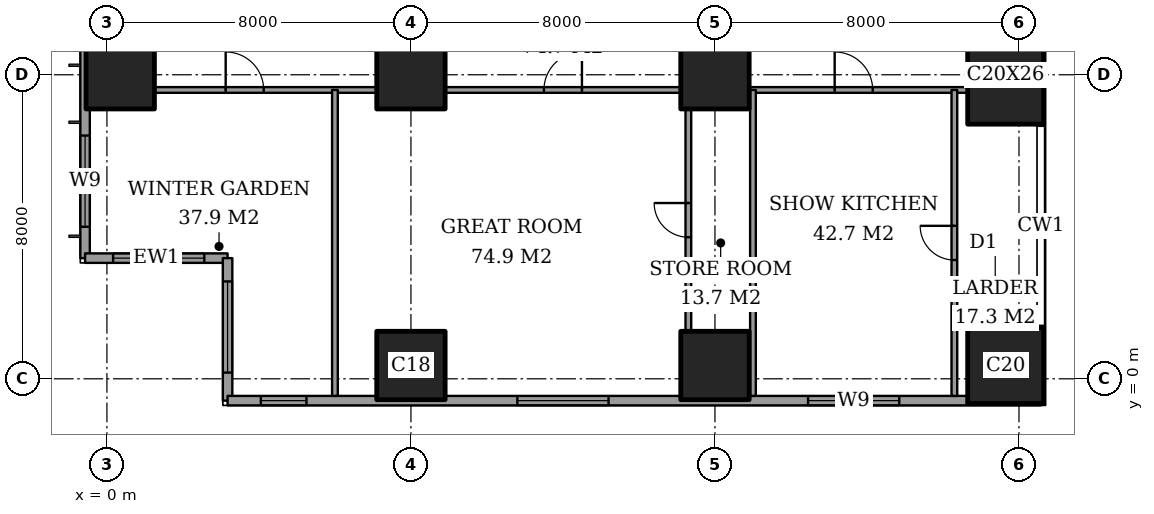
"""IFC4 building model, lengths in metres.
Left out: names, types, materials, properties, quantities, classifications, styles, units other than length and angle.
Written with IfcOpenShell. Run it as: python <this file> out.ifc"""

import sys

from ifc_helpers import new_model, si_unit, direction, frame, frame_2d, origin, origin_2d, place, context, subcontext, project, spatial, rectangle, extrude, element, fill, save


model = new_model("IFC4")
c1 = context("Model", 3, precision=1e-05, world=origin(), true_north=direction((0.0, 1.0)))
c2 = subcontext(c1, "Body", "Model", "MODEL_VIEW")
j1 = project(units=[si_unit("LENGTHUNIT", "METRE"), si_unit("PLANEANGLEUNIT", "RADIAN")], contexts=[c1])
p1 = place(None, origin())
s1 = spatial("IfcSite", under=j1, at=p1, CompositionType="ELEMENT")
p2 = place(p1, origin())
s2 = spatial("IfcBuilding", under=s1, at=p2, CompositionType="ELEMENT")
p3 = place(p2, frame((0.0, 0.0, 193.0)))
s3 = spatial("IfcBuildingStorey", under=s2, at=p3, CompositionType="ELEMENT", Elevation=193.0)
for number, where, z_axis, x_axis in (
    (1, (0.35, 8.0, 0.0), (0.0, 0.0, 1.0), (1.0, 0.0, 0.0)),
    (2, (8.0, 0.35, 0.0), (0.0, 0.0, 1.0), (1.0, 0.0, 0.0)),
    (3, (8.0, 8.0, 0.0), (0.0, 0.0, 1.0), (1.0, 0.0, 0.0)),
    (4, (16.0, 0.35, 0.0), (0.0, 0.0, 1.0), (1.0, 0.0, 0.0)),
    (5, (16.0, 8.0, 0.0), (0.0, 0.0, 1.0), (1.0, 0.0, 0.0)),
):
    element("IfcColumn", number, at=place(p3, frame(where, z_axis=z_axis, x_axis=x_axis)), inside=s3, PredefinedType="COLUMN", context=c2, shape_type="SweptSolid", body=[
        extrude(rectangle(XDim=1.8, YDim=1.8, at=origin_2d()), origin(), (0.0, 0.0, 1.0), 3.6),
    ])
p4 = place(p3, frame((23.65, 0.35, 0.0), z_axis=(0.0, 0.0, 1.0), x_axis=(1.0, 0.0, 0.0)))
e6 = element("IfcColumn", 6, at=p4, inside=s3, PredefinedType="COLUMN", context=c2, shape_type="SweptSolid", body=[
    extrude(rectangle(XDim=2.0, YDim=2.0, at=origin_2d()), origin(), (0.0, 0.0, 1.0), 3.6),
])
p5 = place(p3, frame((23.65, 8.0, 0.0), z_axis=(0.0, 0.0, 1.0), x_axis=(1.0, 0.0, 0.0)))
e7 = element("IfcColumn", 7, at=p5, inside=s3, PredefinedType="COLUMN", context=c2, shape_type="SweptSolid", body=[
    extrude(rectangle(XDim=2.0, YDim=2.6, at=origin_2d()), origin(), (0.0, 0.0, 1.0), 3.6),
])
p6 = place(p3, frame((-0.575, 44.825, 0.0), z_axis=(0.0, 0.0, 1.0), x_axis=(0.0, -1.0, 0.0)))
e8 = element("IfcWall", 8, at=p6, inside=s3, PredefinedType="SOLIDWALL", context=c2, shape_type="SweptSolid", body=[
    extrude(rectangle(XDim=41.65, YDim=0.25, at=frame_2d((20.825, 0.0))), origin(), (0.0, 0.0, 1.0), 3.6),
])
p7 = place(p6, frame((0.825, 0.0, 0.2)))
e9 = element("IfcOpeningElement", 9, at=p7, cuts=e8, PredefinedType="OPENING", context=c2, shape_type="SweptSolid", body=[
    extrude(rectangle(XDim=2.4, YDim=2.4, at=frame_2d((1.2, 1.2))), frame((0.0, 0.135, 0.0), z_axis=(0.0, -1.0, 0.0), x_axis=(1.0, 0.0, 0.0)), (0.0, 0.0, 1.0), 0.27),
])
p8 = place(p6, frame((6.05, 0.0, 0.2)))
e10 = element("IfcOpeningElement", 10, at=p8, cuts=e8, PredefinedType="OPENING", context=c2, shape_type="SweptSolid", body=[
    extrude(rectangle(XDim=1.2, YDim=2.4, at=frame_2d((0.6, 1.2))), frame((0.0, 0.135, 0.0), z_axis=(0.0, -1.0, 0.0), x_axis=(1.0, 0.0, 0.0)), (0.0, 0.0, 1.0), 0.27),
])
p9 = place(p6, frame((8.225, 0.0, 0.2)))
e11 = element("IfcOpeningElement", 11, at=p9, cuts=e8, PredefinedType="OPENING", context=c2, shape_type="SweptSolid", body=[
    extrude(rectangle(XDim=2.4, YDim=2.4, at=frame_2d((1.2, 1.2))), frame((0.0, 0.135, 0.0), z_axis=(0.0, -1.0, 0.0), x_axis=(1.0, 0.0, 0.0)), (0.0, 0.0, 1.0), 0.27),
])
p10 = place(p6, frame((15.625, 0.0, 0.2)))
e12 = element("IfcOpeningElement", 12, at=p10, cuts=e8, PredefinedType="OPENING", context=c2, shape_type="SweptSolid", body=[
    extrude(rectangle(XDim=2.4, YDim=2.4, at=frame_2d((1.2, 1.2))), frame((0.0, 0.135, 0.0), z_axis=(0.0, -1.0, 0.0), x_axis=(1.0, 0.0, 0.0)), (0.0, 0.0, 1.0), 0.27),
])
p11 = place(p6, frame((23.625, 0.0, 0.2)))
e13 = element("IfcOpeningElement", 13, at=p11, cuts=e8, PredefinedType="OPENING", context=c2, shape_type="SweptSolid", body=[
    extrude(rectangle(XDim=2.4, YDim=2.4, at=frame_2d((1.2, 1.2))), frame((0.0, 0.135, 0.0), z_axis=(0.0, -1.0, 0.0), x_axis=(1.0, 0.0, 0.0)), (0.0, 0.0, 1.0), 0.27),
])
p12 = place(p6, frame((30.775, 0.0, 0.2)))
e14 = element("IfcOpeningElement", 14, at=p12, cuts=e8, PredefinedType="OPENING", context=c2, shape_type="SweptSolid", body=[
    extrude(rectangle(XDim=2.4, YDim=2.4, at=frame_2d((1.2, 1.2))), frame((0.0, 0.135, 0.0), z_axis=(0.0, -1.0, 0.0), x_axis=(1.0, 0.0, 0.0)), (0.0, 0.0, 1.0), 0.27),
])
p13 = place(p6, frame((34.55, 0.0, 0.2)))
e15 = element("IfcOpeningElement", 15, at=p13, cuts=e8, PredefinedType="OPENING", context=c2, shape_type="SweptSolid", body=[
    extrude(rectangle(XDim=1.2, YDim=2.4, at=frame_2d((0.6, 1.2))), frame((0.0, 0.135, 0.0), z_axis=(0.0, -1.0, 0.0), x_axis=(1.0, 0.0, 0.0)), (0.0, 0.0, 1.0), 0.27),
])
p14 = place(p6, frame((38.425, 0.0, 0.2)))
e16 = element("IfcOpeningElement", 16, at=p14, cuts=e8, PredefinedType="OPENING", context=c2, shape_type="SweptSolid", body=[
    extrude(rectangle(XDim=2.4, YDim=2.4, at=frame_2d((1.2, 1.2))), frame((0.0, 0.135, 0.0), z_axis=(0.0, -1.0, 0.0), x_axis=(1.0, 0.0, 0.0)), (0.0, 0.0, 1.0), 0.27),
])
p15 = place(p3, frame((-0.575, 3.175, 0.0), z_axis=(0.0, 0.0, 1.0), x_axis=(1.0, 0.0, 0.0)))
e17 = element("IfcWall", 17, at=p15, inside=s3, PredefinedType="SOLIDWALL", context=c2, shape_type="SweptSolid", body=[
    extrude(rectangle(XDim=3.75, YDim=0.25, at=frame_2d((1.875, 0.0))), origin(), (0.0, 0.0, 1.0), 3.6),
])
p16 = place(p15, frame((0.738, 0.0, 0.2)))
e18 = element("IfcOpeningElement", 18, at=p16, cuts=e17, PredefinedType="OPENING", context=c2, shape_type="SweptSolid", body=[
    extrude(rectangle(XDim=2.4, YDim=2.4, at=frame_2d((1.2, 1.2))), frame((0.0, 0.135, 0.0), z_axis=(0.0, -1.0, 0.0), x_axis=(1.0, 0.0, 0.0)), (0.0, 0.0, 1.0), 0.27),
])
p17 = place(p3, frame((3.175, 3.175, 0.0), z_axis=(0.0, 0.0, 1.0), x_axis=(0.0, -1.0, 0.0)))
e19 = element("IfcWall", 19, at=p17, inside=s3, PredefinedType="SOLIDWALL", context=c2, shape_type="SweptSolid", body=[
    extrude(rectangle(XDim=3.75, YDim=0.25, at=frame_2d((1.875, 0.0))), origin(), (0.0, 0.0, 1.0), 3.6),
])
p18 = place(p17, frame((0.613, 0.0, 0.2)))
e20 = element("IfcOpeningElement", 20, at=p18, cuts=e19, PredefinedType="OPENING", context=c2, shape_type="SweptSolid", body=[
    extrude(rectangle(XDim=2.4, YDim=2.4, at=frame_2d((1.2, 1.2))), frame((0.0, 0.135, 0.0), z_axis=(0.0, -1.0, 0.0), x_axis=(1.0, 0.0, 0.0)), (0.0, 0.0, 1.0), 0.27),
])
p19 = place(p3, frame((3.175, -0.575, 0.0), z_axis=(0.0, 0.0, 1.0), x_axis=(1.0, 0.0, 0.0)))
e21 = element("IfcWall", 21, at=p19, inside=s3, PredefinedType="SOLIDWALL", context=c2, shape_type="SweptSolid", body=[
    extrude(rectangle(XDim=21.4, YDim=0.25, at=frame_2d((10.7, 0.0))), origin(), (0.0, 0.0, 1.0), 3.6),
])
p20 = place(p19, frame((0.875, 0.0, 0.2)))
e22 = element("IfcOpeningElement", 22, at=p20, cuts=e21, PredefinedType="OPENING", context=c2, shape_type="SweptSolid", body=[
    extrude(rectangle(XDim=1.2, YDim=2.4, at=frame_2d((0.6, 1.2))), frame((0.0, 0.135, 0.0), z_axis=(0.0, -1.0, 0.0), x_axis=(1.0, 0.0, 0.0)), (0.0, 0.0, 1.0), 0.27),
])
p21 = place(p19, frame((7.625, 0.0, 0.2)))
e23 = element("IfcOpeningElement", 23, at=p21, cuts=e21, PredefinedType="OPENING", context=c2, shape_type="SweptSolid", body=[
    extrude(rectangle(XDim=2.4, YDim=2.4, at=frame_2d((1.2, 1.2))), frame((0.0, 0.135, 0.0), z_axis=(0.0, -1.0, 0.0), x_axis=(1.0, 0.0, 0.0)), (0.0, 0.0, 1.0), 0.27),
])
p22 = place(p19, frame((15.275, 0.0, 0.2)))
e24 = element("IfcOpeningElement", 24, at=p22, cuts=e21, PredefinedType="OPENING", context=c2, shape_type="SweptSolid", body=[
    extrude(rectangle(XDim=2.4, YDim=2.4, at=frame_2d((1.2, 1.2))), frame((0.0, 0.135, 0.0), z_axis=(0.0, -1.0, 0.0), x_axis=(1.0, 0.0, 0.0)), (0.0, 0.0, 1.0), 0.27),
])
p23 = place(p3, frame((1.25, 7.6, 0.0), z_axis=(0.0, 0.0, 1.0), x_axis=(1.0, 0.0, 0.0)))
e25 = element("IfcWall", 25, at=p23, inside=s3, PredefinedType="PARTITIONING", context=c2, shape_type="SweptSolid", body=[
    extrude(rectangle(XDim=5.85, YDim=0.15, at=frame_2d((2.925, 0.0))), origin(), (0.0, 0.0, 1.0), 3.35),
])
p24 = place(p23, frame((1.875, 0.0, 0.0)))
e26 = element("IfcOpeningElement", 26, at=p24, cuts=e25, PredefinedType="OPENING", context=c2, shape_type="SweptSolid", body=[
    extrude(rectangle(XDim=1.0, YDim=2.1, at=frame_2d((0.5, 1.05))), frame((0.0, 0.085, 0.0), z_axis=(0.0, -1.0, 0.0), x_axis=(1.0, 0.0, 0.0)), (0.0, 0.0, 1.0), 0.17),
])
p25 = place(p3, frame((8.9, 7.6, 0.0), z_axis=(0.0, 0.0, 1.0), x_axis=(1.0, 0.0, 0.0)))
e27 = element("IfcWall", 27, at=p25, inside=s3, PredefinedType="PARTITIONING", context=c2, shape_type="SweptSolid", body=[
    extrude(rectangle(XDim=6.2, YDim=0.15, at=frame_2d((3.1, 0.0))), origin(), (0.0, 0.0, 1.0), 3.35),
])
p26 = place(p25, frame((2.6, 0.0, 0.0)))
e28 = element("IfcOpeningElement", 28, at=p26, cuts=e27, PredefinedType="OPENING", context=c2, shape_type="SweptSolid", body=[
    extrude(rectangle(XDim=1.0, YDim=2.1, at=frame_2d((0.5, 1.05))), frame((0.0, 0.085, 0.0), z_axis=(0.0, -1.0, 0.0), x_axis=(1.0, 0.0, 0.0)), (0.0, 0.0, 1.0), 0.17),
])
p27 = place(p3, frame((16.9, 7.6, 0.0), z_axis=(0.0, 0.0, 1.0), x_axis=(1.0, 0.0, 0.0)))
e29 = element("IfcWall", 29, at=p27, inside=s3, PredefinedType="PARTITIONING", context=c2, shape_type="SweptSolid", body=[
    extrude(rectangle(XDim=5.75, YDim=0.15, at=frame_2d((2.875, 0.0))), origin(), (0.0, 0.0, 1.0), 3.35),
])
p28 = place(p27, frame((2.25, 0.0, 0.0)))
e30 = element("IfcOpeningElement", 30, at=p28, cuts=e29, PredefinedType="OPENING", context=c2, shape_type="SweptSolid", body=[
    extrude(rectangle(XDim=1.0, YDim=2.1, at=frame_2d((0.5, 1.05))), frame((0.0, 0.085, 0.0), z_axis=(0.0, -1.0, 0.0), x_axis=(1.0, 0.0, 0.0)), (0.0, 0.0, 1.0), 0.17),
])
p29 = place(p3, frame((6.0, -0.45, 0.0), z_axis=(0.0, 0.0, 1.0), x_axis=(0.0, 1.0, 0.0)))
e31 = element("IfcWall", 31, at=p29, inside=s3, PredefinedType="PARTITIONING", context=c2, shape_type="SweptSolid", body=[
    extrude(rectangle(XDim=8.05, YDim=0.15, at=frame_2d((4.025, 0.0))), origin(), (0.0, 0.0, 1.0), 3.35),
])
p30 = place(p3, frame((15.3, 1.25, 0.0), z_axis=(0.0, 0.0, 1.0), x_axis=(0.0, 1.0, 0.0)))
e32 = element("IfcWall", 32, at=p30, inside=s3, PredefinedType="PARTITIONING", context=c2, shape_type="SweptSolid", body=[
    extrude(rectangle(XDim=5.85, YDim=0.15, at=frame_2d((2.925, 0.0))), origin(), (0.0, 0.0, 1.0), 3.35),
])
p31 = place(p30, frame((2.475, 0.0, 0.0)))
e33 = element("IfcOpeningElement", 33, at=p31, cuts=e32, PredefinedType="OPENING", context=c2, shape_type="SweptSolid", body=[
    extrude(rectangle(XDim=0.9, YDim=2.1, at=frame_2d((0.45, 1.05))), frame((0.0, 0.085, 0.0), z_axis=(0.0, -1.0, 0.0), x_axis=(1.0, 0.0, 0.0)), (0.0, 0.0, 1.0), 0.17),
])
p32 = place(p3, frame((17.0, -0.45, 0.0), z_axis=(0.0, 0.0, 1.0), x_axis=(0.0, 1.0, 0.0)))
e34 = element("IfcWall", 34, at=p32, inside=s3, PredefinedType="PARTITIONING", context=c2, shape_type="SweptSolid", body=[
    extrude(rectangle(XDim=8.05, YDim=0.15, at=frame_2d((4.025, 0.0))), origin(), (0.0, 0.0, 1.0), 3.35),
])
p33 = place(p3, frame((22.3, -0.45, 0.0), z_axis=(0.0, 0.0, 1.0), x_axis=(0.0, 1.0, 0.0)))
e35 = element("IfcWall", 35, at=p33, inside=s3, PredefinedType="PARTITIONING", context=c2, shape_type="SweptSolid", body=[
    extrude(rectangle(XDim=8.05, YDim=0.15, at=frame_2d((4.025, 0.0))), origin(), (0.0, 0.0, 1.0), 3.35),
])
p34 = place(p33, frame((3.575, 0.0, 0.0)))
e36 = element("IfcOpeningElement", 36, at=p34, cuts=e35, PredefinedType="OPENING", context=c2, shape_type="SweptSolid", body=[
    extrude(rectangle(XDim=0.9, YDim=2.1, at=frame_2d((0.45, 1.05))), frame((0.0, 0.085, 0.0), z_axis=(0.0, -1.0, 0.0), x_axis=(1.0, 0.0, 0.0)), (0.0, 0.0, 1.0), 0.17),
])
p35 = place(p14, origin())
e37 = element("IfcWindow", 37, at=p35, inside=s3, PartitioningType="SINGLE_PANEL", PredefinedType="WINDOW", context=c2, shape_type="SweptSolid", body=[
    extrude(rectangle(XDim=2.4, YDim=2.4, at=frame_2d((1.2, 1.2))), frame((0.0, 0.03, 0.0), z_axis=(0.0, -1.0, 0.0), x_axis=(1.0, 0.0, 0.0)), (0.0, 0.0, 1.0), 0.06),
])
fill(e16, e37)
p36 = place(p16, origin())
e38 = element("IfcWindow", 38, at=p36, inside=s3, PartitioningType="SINGLE_PANEL", PredefinedType="WINDOW", context=c2, shape_type="SweptSolid", body=[
    extrude(rectangle(XDim=2.4, YDim=2.4, at=frame_2d((1.2, 1.2))), frame((0.0, 0.03, 0.0), z_axis=(0.0, -1.0, 0.0), x_axis=(1.0, 0.0, 0.0)), (0.0, 0.0, 1.0), 0.06),
])
fill(e18, e38)
p37 = place(p18, origin())
e39 = element("IfcWindow", 39, at=p37, inside=s3, PartitioningType="SINGLE_PANEL", PredefinedType="WINDOW", context=c2, shape_type="SweptSolid", body=[
    extrude(rectangle(XDim=2.4, YDim=2.4, at=frame_2d((1.2, 1.2))), frame((0.0, 0.03, 0.0), z_axis=(0.0, -1.0, 0.0), x_axis=(1.0, 0.0, 0.0)), (0.0, 0.0, 1.0), 0.06),
])
fill(e20, e39)
p38 = place(p20, origin())
e40 = element("IfcWindow", 40, at=p38, inside=s3, PartitioningType="SINGLE_PANEL", PredefinedType="WINDOW", context=c2, shape_type="SweptSolid", body=[
    extrude(rectangle(XDim=1.2, YDim=2.4, at=frame_2d((0.6, 1.2))), frame((0.0, 0.03, 0.0), z_axis=(0.0, -1.0, 0.0), x_axis=(1.0, 0.0, 0.0)), (0.0, 0.0, 1.0), 0.06),
])
fill(e22, e40)
p39 = place(p21, origin())
e41 = element("IfcWindow", 41, at=p39, inside=s3, PartitioningType="SINGLE_PANEL", PredefinedType="WINDOW", context=c2, shape_type="SweptSolid", body=[
    extrude(rectangle(XDim=2.4, YDim=2.4, at=frame_2d((1.2, 1.2))), frame((0.0, 0.03, 0.0), z_axis=(0.0, -1.0, 0.0), x_axis=(1.0, 0.0, 0.0)), (0.0, 0.0, 1.0), 0.06),
])
fill(e23, e41)
p40 = place(p22, origin())
e42 = element("IfcWindow", 42, at=p40, inside=s3, PartitioningType="SINGLE_PANEL", PredefinedType="WINDOW", context=c2, shape_type="SweptSolid", body=[
    extrude(rectangle(XDim=2.4, YDim=2.4, at=frame_2d((1.2, 1.2))), frame((0.0, 0.03, 0.0), z_axis=(0.0, -1.0, 0.0), x_axis=(1.0, 0.0, 0.0)), (0.0, 0.0, 1.0), 0.06),
])
fill(e24, e42)
p41 = place(p24, origin())
e43 = element("IfcDoor", 43, at=p41, inside=s3, OperationType="SINGLE_SWING_RIGHT", PredefinedType="DOOR", context=c2, shape_type="SweptSolid", body=[
    extrude(rectangle(XDim=1.0, YDim=2.1, at=frame_2d((0.5, 1.05))), frame((0.0, 0.025, 0.0), z_axis=(0.0, -1.0, 0.0), x_axis=(1.0, 0.0, 0.0)), (0.0, 0.0, 1.0), 0.05),
])
fill(e26, e43)
p42 = place(p26, origin())
e44 = element("IfcDoor", 44, at=p42, inside=s3, OperationType="SINGLE_SWING_LEFT", PredefinedType="DOOR", context=c2, shape_type="SweptSolid", body=[
    extrude(rectangle(XDim=1.0, YDim=2.1, at=frame_2d((0.5, 1.05))), frame((0.0, 0.025, 0.0), z_axis=(0.0, -1.0, 0.0), x_axis=(1.0, 0.0, 0.0)), (0.0, 0.0, 1.0), 0.05),
])
fill(e28, e44)
p43 = place(p31, origin())
e45 = element("IfcDoor", 45, at=p43, inside=s3, OperationType="SINGLE_SWING_LEFT", PredefinedType="DOOR", context=c2, shape_type="SweptSolid", body=[
    extrude(rectangle(XDim=0.9, YDim=2.1, at=frame_2d((0.45, 1.05))), frame((0.0, 0.025, 0.0), z_axis=(0.0, -1.0, 0.0), x_axis=(1.0, 0.0, 0.0)), (0.0, 0.0, 1.0), 0.05),
])
fill(e33, e45)
p44 = place(p28, origin())
e46 = element("IfcDoor", 46, at=p44, inside=s3, OperationType="SINGLE_SWING_RIGHT", PredefinedType="DOOR", context=c2, shape_type="SweptSolid", body=[
    extrude(rectangle(XDim=1.0, YDim=2.1, at=frame_2d((0.5, 1.05))), frame((0.0, 0.025, 0.0), z_axis=(0.0, -1.0, 0.0), x_axis=(1.0, 0.0, 0.0)), (0.0, 0.0, 1.0), 0.05),
])
fill(e30, e46)
p45 = place(p34, origin())
e47 = element("IfcDoor", 47, at=p45, inside=s3, OperationType="SINGLE_SWING_LEFT", PredefinedType="DOOR", context=c2, shape_type="SweptSolid", body=[
    extrude(rectangle(XDim=0.9, YDim=2.1, at=frame_2d((0.45, 1.05))), frame((0.0, 0.025, 0.0), z_axis=(0.0, -1.0, 0.0), x_axis=(1.0, 0.0, 0.0)), (0.0, 0.0, 1.0), 0.05),
])
fill(e36, e47)
save(model, sys.argv[1])
